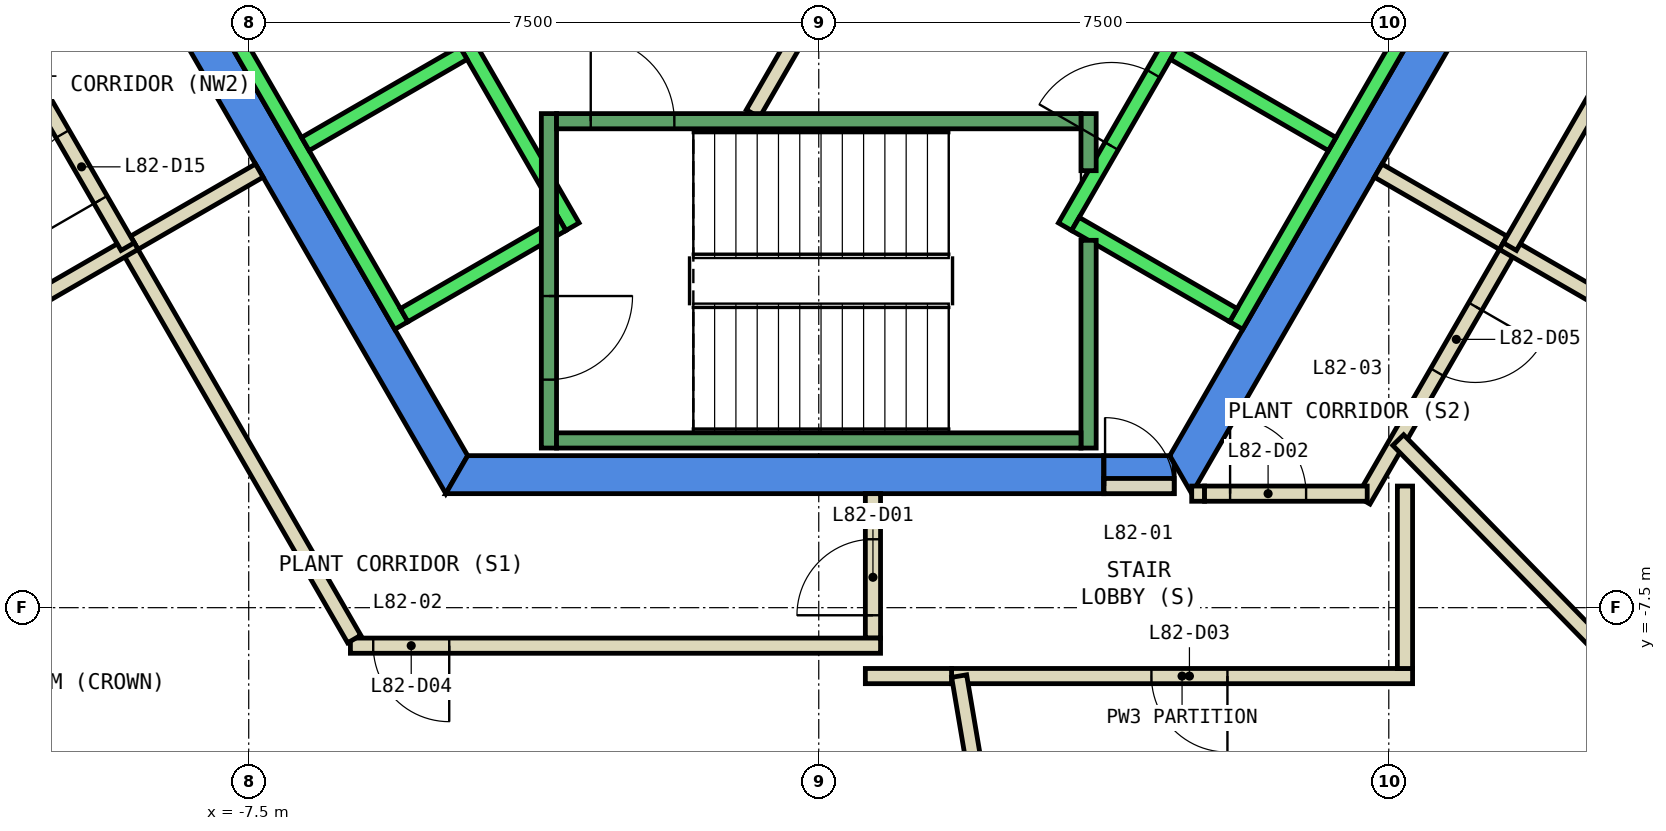
"""IFC4 building model, lengths in metres.
Left out: names, types, materials, properties, quantities, classifications, styles, units other than length and angle.
Written with IfcOpenShell. Run it as: python <this file> out.ifc"""

import sys

from ifc_helpers import new_model, si_unit, direction, frame, frame_2d, origin, place, context, subcontext, project, spatial, polyline, rectangle, outline, extrude, element, fill, save


model = new_model("IFC4")
c1 = context("Model", 3, precision=1e-05, world=origin(), true_north=direction((0.0, 1.0)))
c2 = subcontext(c1, "Body", "Model", "MODEL_VIEW")
j1 = project(units=[si_unit("LENGTHUNIT", "METRE"), si_unit("PLANEANGLEUNIT", "RADIAN")], contexts=[c1])
p1 = place(None, origin())
s1 = spatial("IfcSite", under=j1, at=p1, CompositionType="ELEMENT")
p2 = place(p1, origin())
s2 = spatial("IfcBuilding", under=s1, at=p2, CompositionType="ELEMENT")
p3 = place(p2, frame((0.0, 0.0, 349.4)))
s3 = spatial("IfcBuildingStorey", under=s2, at=p3, CompositionType="ELEMENT", Elevation=349.4)
p4 = place(p3, frame((0.0, 0.0, -0.45)))
e1 = element("IfcWall", 1, at=p4, inside=s3, PredefinedType="SHEAR", context=c2, shape_type="SweptSolid", body=[
    extrude(outline(polyline([(-9.815, 2.5), (-4.907, -6.0), (-4.619, -5.5), (-9.238, 2.5), (-9.815, 2.5)])), origin(), (0.0, 0.0, 1.0), 4.6),
])
p5 = place(p3, frame((0.0, 0.0, -0.45)))
e2 = element("IfcWall", 2, at=p5, inside=s3, PredefinedType="SHEAR", context=c2, shape_type="SweptSolid", body=[
    extrude(outline(polyline([(3.75, -6.0), (3.75, -5.5), (-4.619, -5.5), (-4.907, -6.0), (3.75, -6.0)])), origin(), (0.0, 0.0, 1.0), 4.6),
])
p6 = place(p3, frame((0.0, 0.0, 3.6)))
e3 = element("IfcWall", 3, at=p6, inside=s3, PredefinedType="SHEAR", context=c2, shape_type="SweptSolid", body=[
    extrude(outline(polyline([(4.676, -6.0), (4.676, -5.6), (4.619, -5.5), (3.75, -5.5), (3.75, -6.0), (4.676, -6.0)])), origin(), (0.0, 0.0, 1.0), 0.55),
])
p7 = place(p3, frame((0.0, 0.0, -0.45)))
e4 = element("IfcWall", 4, at=p7, inside=s3, PredefinedType="SHEAR", context=c2, shape_type="SweptSolid", body=[
    extrude(outline(polyline([(4.907, -6.0), (9.815, 2.5), (9.238, 2.5), (4.619, -5.5), (4.907, -6.0)])), origin(), (0.0, 0.0, 1.0), 4.6),
])
p8 = place(p3, frame((-0.866, -1.0, 0.0), z_axis=(0.0, 0.0, 1.0), x_axis=(0.500033287521, 0.866006184372, 0.0)))
e5 = element("IfcWall", 5, at=p8, inside=s3, PredefinedType="PARTITIONING", context=c2, shape_type="SweptSolid", body=[
    extrude(rectangle(XDim=1.632, YDim=0.2, at=frame_2d((0.816, 0.0))), origin(), (0.0, 0.0, 1.0), 4.15),
])
p9 = place(p3, frame((0.713, -7.9, 0.0), z_axis=(0.0, 0.0, 1.0), x_axis=(0.0, 1.0, 0.0)))
e6 = element("IfcWall", 6, at=p9, inside=s3, PredefinedType="PARTITIONING", context=c2, shape_type="SweptSolid", body=[
    extrude(rectangle(XDim=1.9, YDim=0.2, at=frame_2d((0.95, 0.0))), origin(), (0.0, 0.0, 1.0), 4.15),
])
p10 = place(p9, frame((0.3, 0.0, 0.0)))
e7 = element("IfcOpeningElement", 7, at=p10, cuts=e6, PredefinedType="OPENING", context=c2, shape_type="SweptSolid", body=[
    extrude(rectangle(XDim=1.0, YDim=2.1, at=frame_2d((0.5, 1.05))), frame((0.0, 0.11, 0.0), z_axis=(0.0, -1.0, 0.0), x_axis=(1.0, 0.0, 0.0)), (0.0, 0.0, 1.0), 0.22),
])
p11 = place(p3, frame((4.907, -6.0, 0.0), z_axis=(0.0, 0.0, 1.0), x_axis=(1.0, 0.0, 0.0)))
e8 = element("IfcWall", 8, at=p11, inside=s3, PredefinedType="PARTITIONING", context=c2, shape_type="SweptSolid", body=[
    extrude(rectangle(XDim=0.169, YDim=0.2, at=frame_2d((0.084, 0.0))), origin(), (0.0, 0.0, 1.0), 2.4),
])
p12 = place(p3, frame((7.813, -8.4, 0.0), z_axis=(0.0, 0.0, 1.0), x_axis=(-1.0, 0.0, 0.0)))
e9 = element("IfcWall", 9, at=p12, inside=s3, PredefinedType="PARTITIONING", context=c2, shape_type="SweptSolid", body=[
    extrude(rectangle(XDim=6.066, YDim=0.2, at=frame_2d((3.033, 0.0))), origin(), (0.0, 0.0, 1.0), 4.15),
])
p13 = place(p12, frame((2.436, 0.0, 0.0)))
e10 = element("IfcOpeningElement", 10, at=p13, cuts=e9, PredefinedType="OPENING", context=c2, shape_type="SweptSolid", body=[
    extrude(rectangle(XDim=1.0, YDim=2.1, at=frame_2d((0.5, 1.05))), frame((0.0, 0.11, 0.0), z_axis=(0.0, -1.0, 0.0), x_axis=(1.0, 0.0, 0.0)), (0.0, 0.0, 1.0), 0.22),
])
p14 = place(p3, frame((7.713, -5.9, 0.0), z_axis=(0.0, 0.0, 1.0), x_axis=(0.0, -1.0, 0.0)))
e11 = element("IfcWall", 11, at=p14, inside=s3, PredefinedType="PARTITIONING", context=c2, shape_type="SweptSolid", body=[
    extrude(rectangle(XDim=2.4, YDim=0.2, at=frame_2d((1.2, 0.0))), origin(), (0.0, 0.0, 1.0), 4.15),
])
p15 = place(p3, frame((1.747, -8.4, 0.0), z_axis=(0.0, 0.0, 1.0), x_axis=(-1.0, 0.0, 0.0)))
e12 = element("IfcWall", 12, at=p15, inside=s3, PredefinedType="PARTITIONING", context=c2, shape_type="SweptSolid", body=[
    extrude(rectangle(XDim=1.134, YDim=0.2, at=frame_2d((0.567, 0.0))), origin(), (0.0, 0.0, 1.0), 4.15),
])
p16 = place(p3, frame((0.813, -8.0, 0.0), z_axis=(0.0, 0.0, 1.0), x_axis=(-1.0, 0.0, 0.0)))
e13 = element("IfcWall", 13, at=p16, inside=s3, PredefinedType="PARTITIONING", context=c2, shape_type="SweptSolid", body=[
    extrude(rectangle(XDim=6.975, YDim=0.2, at=frame_2d((3.488, 0.0))), origin(), (0.0, 0.0, 1.0), 4.15),
])
p17 = place(p16, frame((5.675, 0.0, 0.0)))
e14 = element("IfcOpeningElement", 14, at=p17, cuts=e13, PredefinedType="OPENING", context=c2, shape_type="SweptSolid", body=[
    extrude(rectangle(XDim=1.0, YDim=2.1, at=frame_2d((0.5, 1.05))), frame((0.0, 0.11, 0.0), z_axis=(0.0, -1.0, 0.0), x_axis=(1.0, 0.0, 0.0)), (0.0, 0.0, 1.0), 0.22),
])
p18 = place(p3, frame((-6.112, -7.913, 0.0), z_axis=(0.0, 0.0, 1.0), x_axis=(-0.500006035293, 0.866021919278, 0.0)))
e15 = element("IfcWall", 15, at=p18, inside=s3, PredefinedType="PARTITIONING", context=c2, shape_type="SweptSolid", body=[
    extrude(rectangle(XDim=5.962, YDim=0.2, at=frame_2d((2.981, 0.0))), origin(), (0.0, 0.0, 1.0), 4.15),
])
p19 = place(p3, frame((-9.006, -2.7, 0.0), z_axis=(0.0, 0.0, 1.0), x_axis=(0.865980106173, 0.500078449558, 0.0)))
e16 = element("IfcWall", 16, at=p19, inside=s3, PredefinedType="PARTITIONING", context=c2, shape_type="SweptSolid", body=[
    extrude(rectangle(XDim=1.9, YDim=0.2, at=frame_2d((0.95, 0.0))), origin(), (0.0, 0.0, 1.0), 4.15),
])
p20 = place(p3, frame((9.093, -2.75, 0.0), z_axis=(0.0, 0.0, 1.0), x_axis=(-0.500084415177, -0.865976661173, 0.0)))
e17 = element("IfcWall", 17, at=p20, inside=s3, PredefinedType="PARTITIONING", context=c2, shape_type="SweptSolid", body=[
    extrude(rectangle(XDim=3.853, YDim=0.2, at=frame_2d((1.927, 0.0))), origin(), (0.0, 0.0, 1.0), 4.15),
])
p21 = place(p20, frame((0.909, 0.0, 0.0)))
e18 = element("IfcOpeningElement", 18, at=p21, cuts=e17, PredefinedType="OPENING", context=c2, shape_type="SweptSolid", body=[
    extrude(rectangle(XDim=1.0, YDim=2.1, at=frame_2d((0.5, 1.05))), frame((0.0, 0.11, 0.0), z_axis=(0.0, -1.0, 0.0), x_axis=(1.0, 0.0, 0.0)), (0.0, 0.0, 1.0), 0.22),
])
p22 = place(p3, frame((7.361, -1.75, 0.0), z_axis=(0.0, 0.0, 1.0), x_axis=(0.865980106173, -0.500078449558, 0.0)))
e19 = element("IfcWall", 19, at=p22, inside=s3, PredefinedType="PARTITIONING", context=c2, shape_type="SweptSolid", body=[
    extrude(rectangle(XDim=1.9, YDim=0.2, at=frame_2d((0.95, 0.0))), origin(), (0.0, 0.0, 1.0), 4.15),
])
p23 = place(p3, frame((2.654, -13.162, 0.0), z_axis=(0.0, 0.0, 1.0), x_axis=(-0.167103233432, 0.985939404516, 0.0)))
e20 = element("IfcWall", 20, at=p23, inside=s3, PredefinedType="PARTITIONING", context=c2, shape_type="SweptSolid", body=[
    extrude(rectangle(XDim=4.83, YDim=0.2, at=frame_2d((2.415, 0.0))), origin(), (0.0, 0.0, 1.0), 4.15),
])
p24 = place(p3, frame((7.624, -5.295, 0.0), z_axis=(0.0, 0.0, 1.0), x_axis=(0.699233052575, -0.71489379504, 0.0)))
e21 = element("IfcWall", 21, at=p24, inside=s3, PredefinedType="PARTITIONING", context=c2, shape_type="SweptSolid", body=[
    extrude(rectangle(XDim=9.587, YDim=0.2, at=frame_2d((4.794, 0.0))), origin(), (0.0, 0.0, 1.0), 4.15),
])
for number, where, z_axis, x_axis in (
    (22, (-17.647, -7.689, 0.0), (0.0, 0.0, 1.0), (0.866, 0.5, 0.0)),
    (23, (9.006, -2.7, 0.0), (0.0, 0.0, 1.0), (0.866, -0.5, 0.0)),
):
    element("IfcWall", number, at=place(p3, frame(where, z_axis=z_axis, x_axis=x_axis)), inside=s3, PredefinedType="PARTITIONING", context=c2, shape_type="SweptSolid", body=[
        extrude(rectangle(XDim=9.978, YDim=0.2, at=frame_2d((4.989, 0.0))), origin(), (0.0, 0.0, 1.0), 4.15),
    ])
p25 = place(p3, frame((12.074, 2.413, 0.0), z_axis=(0.0, 0.0, 1.0), x_axis=(-0.500006035293, -0.866021919278, 0.0)))
e24 = element("IfcWall", 24, at=p25, inside=s3, PredefinedType="PARTITIONING", context=c2, shape_type="SweptSolid", body=[
    extrude(rectangle(XDim=5.962, YDim=0.2, at=frame_2d((2.981, 0.0))), origin(), (0.0, 0.0, 1.0), 4.15),
])
p26 = place(p3, frame((-9.093, -2.75, 0.0), z_axis=(0.0, 0.0, 1.0), x_axis=(-0.50016517285, 0.865930020191, 0.0)))
e25 = element("IfcWall", 25, at=p26, inside=s3, PredefinedType="PARTITIONING", context=c2, shape_type="SweptSolid", body=[
    extrude(rectangle(XDim=2.641, YDim=0.2, at=frame_2d((1.321, 0.0))), origin(), (0.0, 0.0, 1.0), 4.15),
])
p27 = place(p26, frame((0.712, 0.0, 0.0)))
e26 = element("IfcOpeningElement", 26, at=p27, cuts=e25, PredefinedType="OPENING", context=c2, shape_type="SweptSolid", body=[
    extrude(rectangle(XDim=1.0, YDim=2.1, at=frame_2d((0.5, 1.05))), frame((0.0, 0.11, 0.0), z_axis=(0.0, -1.0, 0.0), x_axis=(1.0, 0.0, 0.0)), (0.0, 0.0, 1.0), 0.22),
])
p28 = place(p3, frame((3.75, -5.9, 0.0), z_axis=(0.0, 0.0, 1.0), x_axis=(1.0, 0.0, 0.0)))
e27 = element("IfcWall", 27, at=p28, inside=s3, PredefinedType="PARTITIONING", context=c2, shape_type="SweptSolid", body=[
    extrude(rectangle(XDim=0.926, YDim=0.2, at=frame_2d((0.463, 0.0))), origin(), (0.0, 0.0, 1.0), 2.4),
])
p29 = place(p28, frame((0.017, 0.0, 0.0)))
e28 = element("IfcOpeningElement", 28, at=p29, cuts=e27, PredefinedType="OPENING", context=c2, shape_type="SweptSolid", body=[
    extrude(rectangle(XDim=0.9, YDim=2.1, at=frame_2d((0.45, 1.05))), frame((0.0, 0.11, 0.0), z_axis=(0.0, -1.0, 0.0), x_axis=(1.0, 0.0, 0.0)), (0.0, 0.0, 1.0), 0.22),
])
p30 = place(p3, frame((5.076, -6.0, 0.0), z_axis=(0.0, 0.0, 1.0), x_axis=(1.0, 0.0, 0.0)))
e29 = element("IfcWall", 29, at=p30, inside=s3, PredefinedType="PARTITIONING", context=c2, shape_type="SweptSolid", body=[
    extrude(rectangle(XDim=2.14, YDim=0.2, at=frame_2d((1.07, 0.0))), origin(), (0.0, 0.0, 1.0), 4.15),
])
p31 = place(p30, frame((0.336, 0.0, 0.0)))
e30 = element("IfcOpeningElement", 30, at=p31, cuts=e29, PredefinedType="OPENING", context=c2, shape_type="SweptSolid", body=[
    extrude(rectangle(XDim=1.0, YDim=2.1, at=frame_2d((0.5, 1.05))), frame((0.0, 0.11, 0.0), z_axis=(0.0, -1.0, 0.0), x_axis=(1.0, 0.0, 0.0)), (0.0, 0.0, 1.0), 0.22),
])
p32 = place(p3, frame((-5.94, 2.188, 0.0), z_axis=(0.0, 0.0, 1.0), x_axis=(0.500034260056, -0.866005622828, 0.0)))
e31 = element("IfcWall", 31, at=p32, inside=s3, PredefinedType="STANDARD", context=c2, shape_type="SweptSolid", body=[
    extrude(rectangle(XDim=5.399, YDim=0.2, at=frame_2d((2.7, 0.0))), origin(), (0.0, 0.0, 1.0), 4.15),
])
p33 = place(p32, frame((1.225, 0.0, 0.0)))
e32 = element("IfcOpeningElement", 32, at=p33, cuts=e31, PredefinedType="OPENING", context=c2, shape_type="SweptSolid", body=[
    extrude(rectangle(XDim=1.1, YDim=2.1, at=frame_2d((0.55, 1.05))), frame((0.0, 0.11, 0.0), z_axis=(0.0, -1.0, 0.0), x_axis=(1.0, 0.0, 0.0)), (0.0, 0.0, 1.0), 0.22),
])
p34 = place(p3, frame((-8.192, 0.888, 0.0), z_axis=(0.0, 0.0, 1.0), x_axis=(0.500034260056, -0.866005622828, 0.0)))
e33 = element("IfcWall", 33, at=p34, inside=s3, PredefinedType="STANDARD", context=c2, shape_type="SweptSolid", body=[
    extrude(rectangle(XDim=5.399, YDim=0.2, at=frame_2d((2.7, 0.0))), origin(), (0.0, 0.0, 1.0), 4.15),
])
p35 = place(p3, frame((-4.677, -0.2, 0.0), z_axis=(0.0, 0.0, 1.0), x_axis=(-0.865973769406, -0.500089422704, 0.0)))
e34 = element("IfcWall", 34, at=p35, inside=s3, PredefinedType="STANDARD", context=c2, shape_type="SweptSolid", body=[
    extrude(rectangle(XDim=2.399, YDim=0.2, at=frame_2d((1.2, 0.0))), origin(), (0.0, 0.0, 1.0), 4.15),
])
p36 = place(p3, frame((-3.377, -2.452, 0.0), z_axis=(0.0, 0.0, 1.0), x_axis=(-0.865955154139, -0.50012165622, 0.0)))
e35 = element("IfcWall", 35, at=p36, inside=s3, PredefinedType="STANDARD", context=c2, shape_type="SweptSolid", body=[
    extrude(rectangle(XDim=2.4, YDim=0.2, at=frame_2d((1.2, 0.0))), origin(), (0.0, 0.0, 1.0), 4.15),
])
p37 = place(p3, frame((3.24, -2.488, 0.0), z_axis=(0.0, 0.0, 1.0), x_axis=(0.500034260056, 0.866005622828, 0.0)))
e36 = element("IfcWall", 36, at=p37, inside=s3, PredefinedType="STANDARD", context=c2, shape_type="SweptSolid", body=[
    extrude(rectangle(XDim=5.399, YDim=0.2, at=frame_2d((2.7, 0.0))), origin(), (0.0, 0.0, 1.0), 4.15),
])
p38 = place(p37, frame((1.225, 0.0, 0.0)))
e37 = element("IfcOpeningElement", 37, at=p38, cuts=e36, PredefinedType="OPENING", context=c2, shape_type="SweptSolid", body=[
    extrude(rectangle(XDim=1.1, YDim=2.1, at=frame_2d((0.55, 1.05))), frame((0.0, 0.11, 0.0), z_axis=(0.0, -1.0, 0.0), x_axis=(1.0, 0.0, 0.0)), (0.0, 0.0, 1.0), 0.22),
])
p39 = place(p3, frame((5.492, -3.788, 0.0), z_axis=(0.0, 0.0, 1.0), x_axis=(0.500034260056, 0.866005622828, 0.0)))
e38 = element("IfcWall", 38, at=p39, inside=s3, PredefinedType="STANDARD", context=c2, shape_type="SweptSolid", body=[
    extrude(rectangle(XDim=5.399, YDim=0.2, at=frame_2d((2.7, 0.0))), origin(), (0.0, 0.0, 1.0), 4.15),
])
p40 = place(p3, frame((3.377, -2.452, 0.0), z_axis=(0.0, 0.0, 1.0), x_axis=(0.865955154139, -0.50012165622, 0.0)))
e39 = element("IfcWall", 39, at=p40, inside=s3, PredefinedType="STANDARD", context=c2, shape_type="SweptSolid", body=[
    extrude(rectangle(XDim=2.4, YDim=0.2, at=frame_2d((1.2, 0.0))), origin(), (0.0, 0.0, 1.0), 4.15),
])
p41 = place(p3, frame((4.677, -0.2, 0.0), z_axis=(0.0, 0.0, 1.0), x_axis=(0.865973769406, -0.500089422704, 0.0)))
e40 = element("IfcWall", 40, at=p41, inside=s3, PredefinedType="STANDARD", context=c2, shape_type="SweptSolid", body=[
    extrude(rectangle(XDim=2.399, YDim=0.2, at=frame_2d((1.2, 0.0))), origin(), (0.0, 0.0, 1.0), 4.15),
])
p42 = place(p3, frame((-3.55, -1.0, 0.0), z_axis=(0.0, 0.0, 1.0), x_axis=(0.0, -1.0, 0.0)))
e41 = element("IfcWall", 41, at=p42, inside=s3, PredefinedType="STANDARD", context=c2, shape_type="SweptSolid", body=[
    extrude(rectangle(XDim=4.4, YDim=0.2, at=frame_2d((2.2, 0.0))), origin(), (0.0, 0.0, 1.0), 4.15),
])
p43 = place(p42, frame((2.4, 0.0, 0.0)))
e42 = element("IfcOpeningElement", 42, at=p43, cuts=e41, PredefinedType="OPENING", context=c2, shape_type="SweptSolid", body=[
    extrude(rectangle(XDim=1.1, YDim=2.2, at=frame_2d((0.55, 1.1))), frame((0.0, 0.11, 0.0), z_axis=(0.0, -1.0, 0.0), x_axis=(1.0, 0.0, 0.0)), (0.0, 0.0, 1.0), 0.22),
])
p44 = place(p3, frame((3.55, -2.667, 0.0), z_axis=(0.0, 0.0, 1.0), x_axis=(0.0, -1.0, 0.0)))
e43 = element("IfcWall", 43, at=p44, inside=s3, PredefinedType="STANDARD", context=c2, shape_type="SweptSolid", body=[
    extrude(rectangle(XDim=2.733, YDim=0.2, at=frame_2d((1.366, 0.0))), origin(), (0.0, 0.0, 1.0), 4.15),
])
p45 = place(p3, frame((3.55, -1.0, 0.0), z_axis=(0.0, 0.0, 1.0), x_axis=(0.0, -1.0, 0.0)))
e44 = element("IfcWall", 44, at=p45, inside=s3, PredefinedType="STANDARD", context=c2, shape_type="SweptSolid", body=[
    extrude(rectangle(XDim=0.751, YDim=0.2, at=frame_2d((0.375, 0.0))), origin(), (0.0, 0.0, 1.0), 4.15),
])
p46 = place(p3, frame((-3.45, -1.1, 0.0), z_axis=(0.0, 0.0, 1.0), x_axis=(1.0, 0.0, 0.0)))
e45 = element("IfcWall", 45, at=p46, inside=s3, PredefinedType="STANDARD", context=c2, shape_type="SweptSolid", body=[
    extrude(rectangle(XDim=6.9, YDim=0.2, at=frame_2d((3.45, 0.0))), origin(), (0.0, 0.0, 1.0), 4.15),
])
p47 = place(p46, frame((0.45, 0.0, 0.0)))
e46 = element("IfcOpeningElement", 46, at=p47, cuts=e45, PredefinedType="OPENING", context=c2, shape_type="SweptSolid", body=[
    extrude(rectangle(XDim=1.1, YDim=2.2, at=frame_2d((0.55, 1.1))), frame((0.0, 0.11, 0.0), z_axis=(0.0, -1.0, 0.0), x_axis=(1.0, 0.0, 0.0)), (0.0, 0.0, 1.0), 0.22),
])
p48 = place(p3, frame((-3.45, -5.3, 0.0), z_axis=(0.0, 0.0, 1.0), x_axis=(1.0, 0.0, 0.0)))
e47 = element("IfcWall", 47, at=p48, inside=s3, PredefinedType="STANDARD", context=c2, shape_type="SweptSolid", body=[
    extrude(rectangle(XDim=6.9, YDim=0.2, at=frame_2d((3.45, 0.0))), origin(), (0.0, 0.0, 1.0), 4.15),
])
p49 = place(p10, origin())
e48 = element("IfcDoor", 48, at=p49, inside=s3, OperationType="SINGLE_SWING_LEFT", PredefinedType="DOOR", context=c2, shape_type="SweptSolid", body=[
    extrude(rectangle(XDim=1.0, YDim=2.1, at=frame_2d((0.5, 1.05))), frame((0.0, 0.025, 0.0), z_axis=(0.0, -1.0, 0.0), x_axis=(1.0, 0.0, 0.0)), (0.0, 0.0, 1.0), 0.05),
])
fill(e7, e48)
p50 = place(p31, origin())
e49 = element("IfcDoor", 49, at=p50, inside=s3, OperationType="SINGLE_SWING_RIGHT", PredefinedType="DOOR", context=c2, shape_type="SweptSolid", body=[
    extrude(rectangle(XDim=1.0, YDim=2.1, at=frame_2d((0.5, 1.05))), frame((0.0, 0.025, 0.0), z_axis=(0.0, -1.0, 0.0), x_axis=(1.0, 0.0, 0.0)), (0.0, 0.0, 1.0), 0.05),
])
fill(e30, e49)
p51 = place(p13, origin())
e50 = element("IfcDoor", 50, at=p51, inside=s3, OperationType="SINGLE_SWING_LEFT", PredefinedType="DOOR", context=c2, shape_type="SweptSolid", body=[
    extrude(rectangle(XDim=1.0, YDim=2.1, at=frame_2d((0.5, 1.05))), frame((0.0, 0.025, 0.0), z_axis=(0.0, -1.0, 0.0), x_axis=(1.0, 0.0, 0.0)), (0.0, 0.0, 1.0), 0.05),
])
fill(e10, e50)
p52 = place(p17, origin())
e51 = element("IfcDoor", 51, at=p52, inside=s3, OperationType="SINGLE_SWING_RIGHT", PredefinedType="DOOR", context=c2, shape_type="SweptSolid", body=[
    extrude(rectangle(XDim=1.0, YDim=2.1, at=frame_2d((0.5, 1.05))), frame((0.0, 0.025, 0.0), z_axis=(0.0, -1.0, 0.0), x_axis=(1.0, 0.0, 0.0)), (0.0, 0.0, 1.0), 0.05),
])
fill(e14, e51)
p53 = place(p21, origin())
e52 = element("IfcDoor", 52, at=p53, inside=s3, OperationType="SINGLE_SWING_LEFT", PredefinedType="DOOR", context=c2, shape_type="SweptSolid", body=[
    extrude(rectangle(XDim=1.0, YDim=2.1, at=frame_2d((0.5, 1.05))), frame((0.0, 0.025, 0.0), z_axis=(0.0, -1.0, 0.0), x_axis=(1.0, 0.0, 0.0)), (0.0, 0.0, 1.0), 0.05),
])
fill(e18, e52)
p54 = place(p27, origin())
e53 = element("IfcDoor", 53, at=p54, inside=s3, OperationType="SINGLE_SWING_LEFT", PredefinedType="DOOR", context=c2, shape_type="SweptSolid", body=[
    extrude(rectangle(XDim=1.0, YDim=2.1, at=frame_2d((0.5, 1.05))), frame((0.0, 0.025, 0.0), z_axis=(0.0, -1.0, 0.0), x_axis=(1.0, 0.0, 0.0)), (0.0, 0.0, 1.0), 0.05),
])
fill(e26, e53)
p55 = place(p29, origin())
e54 = element("IfcDoor", 54, at=p55, inside=s3, OperationType="SINGLE_SWING_LEFT", PredefinedType="DOOR", context=c2, shape_type="SweptSolid", body=[
    extrude(rectangle(XDim=0.9, YDim=2.1, at=frame_2d((0.45, 1.05))), frame((0.0, 0.025, 0.0), z_axis=(0.0, -1.0, 0.0), x_axis=(1.0, 0.0, 0.0)), (0.0, 0.0, 1.0), 0.05),
])
fill(e28, e54)
p56 = place(p38, origin())
e55 = element("IfcDoor", 55, at=p56, inside=s3, OperationType="SLIDING_TO_LEFT", PredefinedType="DOOR", context=c2, shape_type="SweptSolid", body=[
    extrude(rectangle(XDim=1.1, YDim=2.1, at=frame_2d((0.55, 1.05))), frame((0.0, 0.025, 0.0), z_axis=(0.0, -1.0, 0.0), x_axis=(1.0, 0.0, 0.0)), (0.0, 0.0, 1.0), 0.05),
])
fill(e37, e55)
p57 = place(p47, origin())
e56 = element("IfcDoor", 56, at=p57, inside=s3, OperationType="SINGLE_SWING_LEFT", PredefinedType="DOOR", context=c2, shape_type="SweptSolid", body=[
    extrude(rectangle(XDim=1.1, YDim=2.2, at=frame_2d((0.55, 1.1))), frame((0.0, 0.025, 0.0), z_axis=(0.0, -1.0, 0.0), x_axis=(1.0, 0.0, 0.0)), (0.0, 0.0, 1.0), 0.05),
])
fill(e46, e56)
p58 = place(p43, origin())
e57 = element("IfcDoor", 57, at=p58, inside=s3, OperationType="SINGLE_SWING_LEFT", PredefinedType="DOOR", context=c2, shape_type="SweptSolid", body=[
    extrude(rectangle(XDim=1.1, YDim=2.2, at=frame_2d((0.55, 1.1))), frame((0.0, 0.025, 0.0), z_axis=(0.0, -1.0, 0.0), x_axis=(1.0, 0.0, 0.0)), (0.0, 0.0, 1.0), 0.05),
])
fill(e42, e57)
save(model, sys.argv[1])
